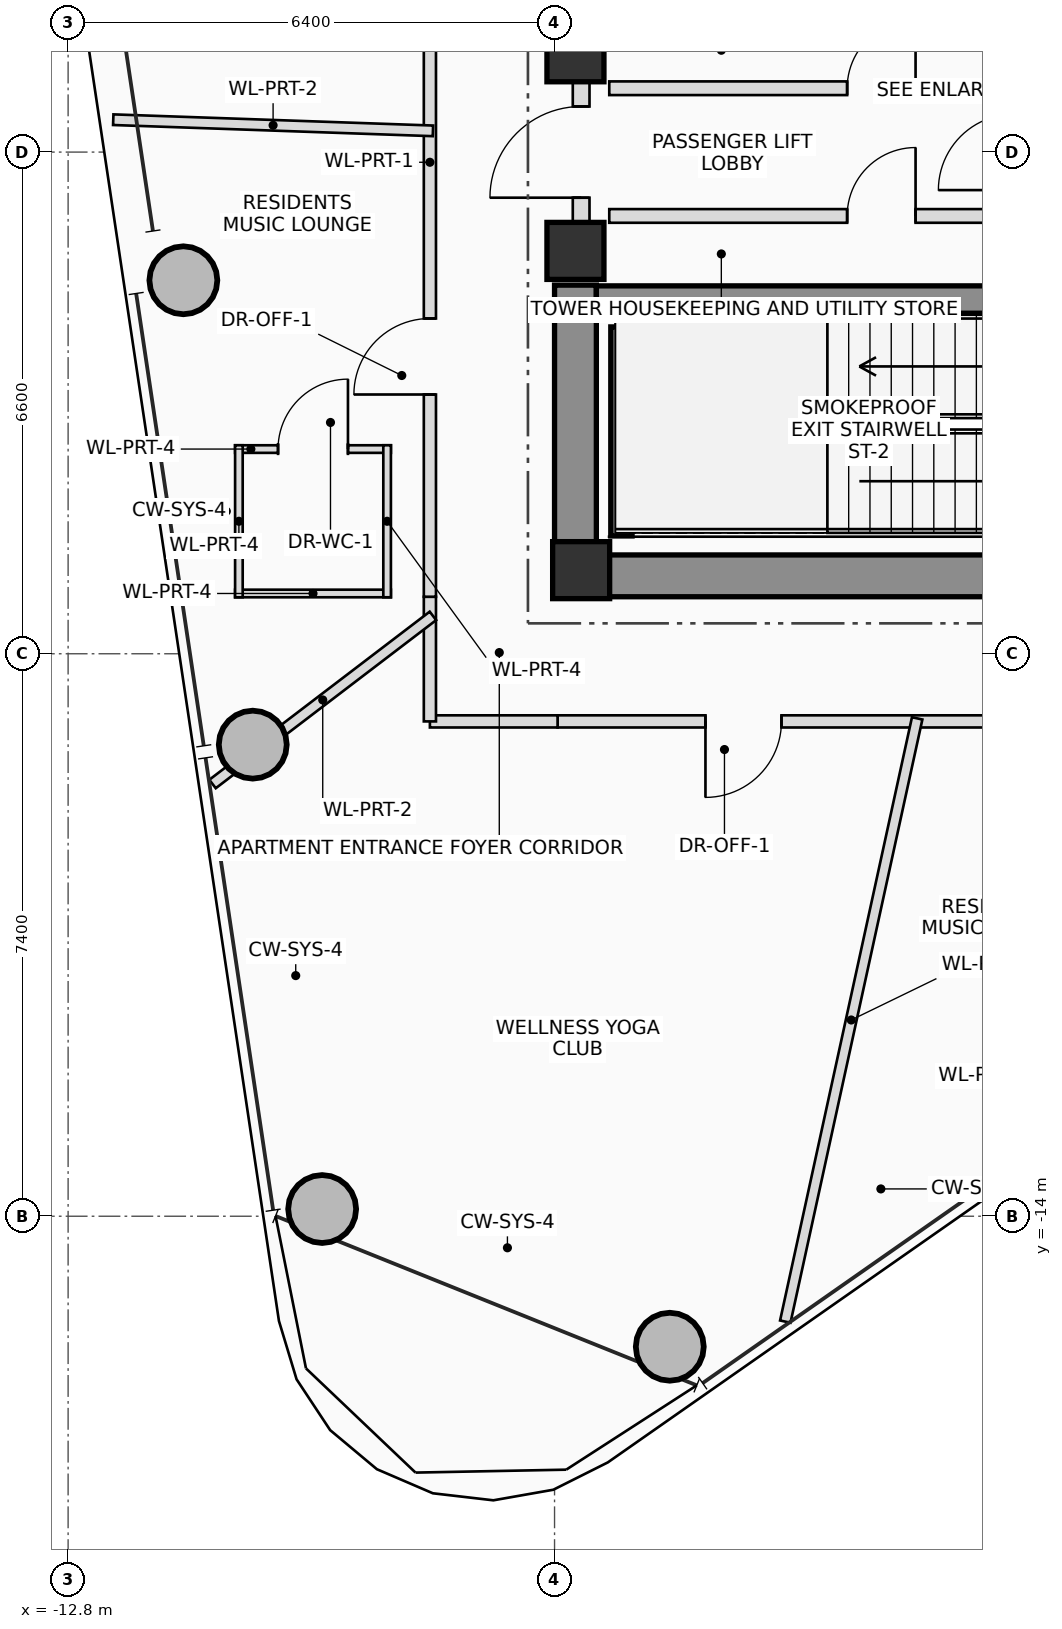
"""IFC4 building model, lengths in metres.
Left out: names, types, materials, properties, quantities, classifications, styles, units other than length and angle.
Written with IfcOpenShell. Run it as: python <this file> out.ifc"""

import sys

from ifc_helpers import new_model, si_unit, direction, frame, frame_2d, origin, origin_2d, place, context, subcontext, project, spatial, rectangle, hollow_circle, extrude, source, transform, mapped, element, fill, save


model = new_model("IFC4")
c1 = context("Model", 3, precision=1e-05, world=origin(), true_north=direction((0.0, 1.0)))
c2 = subcontext(c1, "Body", "Model", "MODEL_VIEW")
j1 = project(units=[si_unit("LENGTHUNIT", "METRE"), si_unit("PLANEANGLEUNIT", "RADIAN")], contexts=[c1])
p1 = place(None, origin())
s1 = spatial("IfcSite", under=j1, at=p1, CompositionType="ELEMENT")
p2 = place(p1, origin())
s2 = spatial("IfcBuilding", under=s1, at=p2, CompositionType="ELEMENT")
p3 = place(p2, frame((0.0, 0.0, 264.35)))
s3 = spatial("IfcBuildingStorey", under=s2, at=p3, CompositionType="ELEMENT", Elevation=264.35)
m1 = source(origin(), c2, "Body", "SweptSolid", [
    extrude(rectangle(XDim=0.75, YDim=0.75, at=origin_2d()), origin(), (0.0, 0.0, 1.0), 3.4),
])
p4 = place(p3, frame((-6.05, -5.5, 0.0), z_axis=(0.0, 0.0, 1.0), x_axis=(1.0, 0.0, 0.0)))
e1 = element("IfcColumn", 1, at=p4, inside=s3, PredefinedType="COLUMN", context=c2, shape_type="MappedRepresentation", body=[
    mapped(m1, transform((0.0, 0.0, 0.0), scale=1.0)),
])
p5 = place(p3, frame((-6.4, -5.575, 0.0), z_axis=(0.0, 0.0, 1.0), x_axis=(1.0, 0.0, 0.0)))
e2 = element("IfcWall", 2, at=p5, inside=s3, PredefinedType="SHEAR", context=c2, shape_type="SweptSolid", body=[
    extrude(rectangle(XDim=12.8, YDim=0.55, at=frame_2d((6.4, 0.0))), origin(), (0.0, 0.0, 1.0), 3.4),
])
p6 = place(p5, frame((8.6, 0.0, 0.0)))
e3 = element("IfcOpeningElement", 3, at=p6, cuts=e2, PredefinedType="OPENING", context=c2, shape_type="SweptSolid", body=[
    extrude(rectangle(XDim=1.2, YDim=2.2, at=frame_2d((0.6, 1.1))), frame((0.0, 0.285, 0.0), z_axis=(0.0, -1.0, 0.0), x_axis=(1.0, 0.0, 0.0)), (0.0, 0.0, 1.0), 0.57),
])
p7 = place(p3, frame((-6.125, -5.3, 0.0), z_axis=(0.0, 0.0, 1.0), x_axis=(0.0, 1.0, 0.0)))
e4 = element("IfcWall", 4, at=p7, inside=s3, PredefinedType="SHEAR", context=c2, shape_type="SweptSolid", body=[
    extrude(rectangle(XDim=3.55, YDim=0.55, at=frame_2d((1.775, 0.0))), origin(), (0.0, 0.0, 1.0), 3.4),
])
p8 = place(p3, frame((-5.85, -1.94, 0.0), z_axis=(0.0, 0.0, 1.0), x_axis=(1.0, 0.0, 0.0)))
e5 = element("IfcWall", 5, at=p8, inside=s3, PredefinedType="SHEAR", context=c2, shape_type="SweptSolid", body=[
    extrude(rectangle(XDim=11.7, YDim=0.36, at=frame_2d((5.85, 0.0))), origin(), (0.0, 0.0, 1.0), 3.4),
])
p9 = place(p3, frame((-5.52, -5.05, 0.0), z_axis=(0.0, 0.0, 1.0), x_axis=(0.0, 1.0, 0.0)))
e6 = element("IfcWall", 6, at=p9, inside=s3, PredefinedType="SHEAR", context=c2, shape_type="SweptSolid", body=[
    extrude(rectangle(XDim=2.75, YDim=0.28, at=frame_2d((1.375, 0.0))), origin(), (0.0, 0.0, 1.0), 3.4),
])
for number, where, z_axis, x_axis in (
    (7, (-6.125, -1.3, 0.0), (0.0, 0.0, 1.0), (1.0, 0.0, 0.0)),
    (8, (-6.125, 1.3, 0.0), (0.0, 0.0, 1.0), (1.0, 0.0, 0.0)),
):
    element("IfcColumn", number, at=place(p3, frame(where, z_axis=z_axis, x_axis=x_axis)), inside=s3, PredefinedType="COLUMN", context=c2, shape_type="MappedRepresentation", body=[
        mapped(m1, transform((0.0, 0.0, 0.0), scale=1.0)),
    ])
m2 = source(origin(), c2, "Body", "SweptSolid", [
    extrude(hollow_circle(Radius=0.45, WallThickness=0.032, at=origin_2d()), origin(), (0.0, 0.0, 1.0), 3.4),
])
for number, where, z_axis, x_axis in (
    (9, (-4.884, -15.717, 0.0), (0.0, 0.0, 1.0), (1.0, 0.0, 0.0)),
    (10, (-11.284, -1.686, 0.0), (0.0, 0.0, 1.0), (1.0, 0.0, 0.0)),
    (11, (-10.371, -7.796, 0.0), (0.0, 0.0, 1.0), (1.0, 0.0, 0.0)),
    (12, (-9.458, -13.905, 0.0), (0.0, 0.0, 1.0), (1.0, 0.0, 0.0)),
):
    element("IfcColumn", number, at=place(p3, frame(where, z_axis=z_axis, x_axis=x_axis)), inside=s3, PredefinedType="COLUMN", context=c2, shape_type="MappedRepresentation", body=[
        mapped(m2, transform((0.0, 0.0, 0.0), scale=1.0)),
    ])
p10 = place(p3, frame((-6.05, -0.95, 0.0), z_axis=(0.0, 0.0, 1.0), x_axis=(0.0, 1.0, 0.0)))
e13 = element("IfcWall", 13, at=p10, inside=s3, PredefinedType="PLUMBINGWALL", context=c2, shape_type="SweptSolid", body=[
    extrude(rectangle(XDim=1.9, YDim=0.22, at=frame_2d((0.95, 0.0))), origin(), (0.0, 0.0, 1.0), 2.18),
])
p11 = place(p10, frame((0.35, 0.0, 0.0)))
e14 = element("IfcOpeningElement", 14, at=p11, cuts=e13, PredefinedType="OPENING", context=c2, shape_type="SweptSolid", body=[
    extrude(rectangle(XDim=1.2, YDim=2.2, at=frame_2d((0.6, 1.1))), frame((0.0, 0.12, 0.0), z_axis=(0.0, -1.0, 0.0), x_axis=(1.0, 0.0, 0.0)), (0.0, 0.0, 1.0), 0.24),
])
p12 = place(p3, frame((-5.68, 0.84, 0.0), z_axis=(0.0, 0.0, 1.0), x_axis=(1.0, 0.0, 0.0)))
e15 = element("IfcWall", 15, at=p12, inside=s3, PredefinedType="PLUMBINGWALL", context=c2, shape_type="SweptSolid", body=[
    extrude(rectangle(XDim=11.33, YDim=0.18, at=frame_2d((5.665, 0.0))), origin(), (0.0, 0.0, 1.0), 3.2),
])
p13 = place(p12, frame((3.13, 0.0, 0.0)))
e16 = element("IfcOpeningElement", 16, at=p13, cuts=e15, PredefinedType="OPENING", context=c2, shape_type="SweptSolid", body=[
    extrude(rectangle(XDim=0.9, YDim=2.05, at=frame_2d((0.45, 1.025))), frame((0.0, 0.1, 0.0), z_axis=(0.0, -1.0, 0.0), x_axis=(1.0, 0.0, 0.0)), (0.0, 0.0, 1.0), 0.2),
])
p14 = place(p12, frame((7.33, 0.0, 0.0)))
e17 = element("IfcOpeningElement", 17, at=p14, cuts=e15, PredefinedType="OPENING", context=c2, shape_type="SweptSolid", body=[
    extrude(rectangle(XDim=1.1, YDim=2.2, at=frame_2d((0.55, 1.1))), frame((0.0, 0.1, 0.0), z_axis=(0.0, -1.0, 0.0), x_axis=(1.0, 0.0, 0.0)), (0.0, 0.0, 1.0), 0.2),
])
p15 = place(p12, frame((8.83, 0.0, 0.0)))
e18 = element("IfcOpeningElement", 18, at=p15, cuts=e15, PredefinedType="OPENING", context=c2, shape_type="SweptSolid", body=[
    extrude(rectangle(XDim=1.1, YDim=2.2, at=frame_2d((0.55, 1.1))), frame((0.0, 0.1, 0.0), z_axis=(0.0, -1.0, 0.0), x_axis=(1.0, 0.0, 0.0)), (0.0, 0.0, 1.0), 0.2),
])
p16 = place(p12, frame((10.25, 0.0, 0.0)))
e19 = element("IfcOpeningElement", 19, at=p16, cuts=e15, PredefinedType="OPENING", context=c2, shape_type="SweptSolid", body=[
    extrude(rectangle(XDim=0.9, YDim=2.05, at=frame_2d((0.45, 1.025))), frame((0.0, 0.1, 0.0), z_axis=(0.0, -1.0, 0.0), x_axis=(1.0, 0.0, 0.0)), (0.0, 0.0, 1.0), 0.2),
])
p17 = place(p3, frame((-5.68, -0.84, 0.0), z_axis=(0.0, 0.0, 1.0), x_axis=(1.0, 0.0, 0.0)))
e20 = element("IfcWall", 20, at=p17, inside=s3, PredefinedType="PLUMBINGWALL", context=c2, shape_type="SweptSolid", body=[
    extrude(rectangle(XDim=11.33, YDim=0.18, at=frame_2d((5.665, 0.0))), origin(), (0.0, 0.0, 1.0), 3.2),
])
p18 = place(p17, frame((3.13, 0.0, 0.0)))
e21 = element("IfcOpeningElement", 21, at=p18, cuts=e20, PredefinedType="OPENING", context=c2, shape_type="SweptSolid", body=[
    extrude(rectangle(XDim=0.9, YDim=2.05, at=frame_2d((0.45, 1.025))), frame((0.0, 0.1, 0.0), z_axis=(0.0, -1.0, 0.0), x_axis=(1.0, 0.0, 0.0)), (0.0, 0.0, 1.0), 0.2),
])
p19 = place(p17, frame((7.33, 0.0, 0.0)))
e22 = element("IfcOpeningElement", 22, at=p19, cuts=e20, PredefinedType="OPENING", context=c2, shape_type="SweptSolid", body=[
    extrude(rectangle(XDim=1.1, YDim=2.2, at=frame_2d((0.55, 1.1))), frame((0.0, 0.1, 0.0), z_axis=(0.0, -1.0, 0.0), x_axis=(1.0, 0.0, 0.0)), (0.0, 0.0, 1.0), 0.2),
])
p20 = place(p17, frame((9.58, 0.0, 0.0)))
e23 = element("IfcOpeningElement", 23, at=p20, cuts=e20, PredefinedType="OPENING", context=c2, shape_type="SweptSolid", body=[
    extrude(rectangle(XDim=0.9, YDim=2.05, at=frame_2d((0.45, 1.025))), frame((0.0, 0.1, 0.0), z_axis=(0.0, -1.0, 0.0), x_axis=(1.0, 0.0, 0.0)), (0.0, 0.0, 1.0), 0.2),
])
p21 = place(p3, frame((-10.603, -3.907, 0.0), z_axis=(0.0, 0.0, 1.0), x_axis=(1.0, 0.0, 0.0)))
e24 = element("IfcWall", 24, at=p21, inside=s3, PredefinedType="PARTITIONING", context=c2, shape_type="SweptSolid", body=[
    extrude(rectangle(XDim=2.05, YDim=0.1, at=frame_2d((1.025, 0.0))), origin(), (0.0, 0.0, 1.0), 2.805),
])
p22 = place(p21, frame((0.565, 0.0, 0.0)))
e25 = element("IfcOpeningElement", 25, at=p22, cuts=e24, PredefinedType="OPENING", context=c2, shape_type="SweptSolid", body=[
    extrude(rectangle(XDim=0.92, YDim=2.1, at=frame_2d((0.46, 1.05))), frame((0.0, 0.06, 0.0), z_axis=(0.0, -1.0, 0.0), x_axis=(1.0, 0.0, 0.0)), (0.0, 0.0, 1.0), 0.12),
])
p23 = place(p3, frame((-8.553, -5.807, 0.0), z_axis=(0.0, 0.0, 1.0), x_axis=(-1.0, 0.0, 0.0)))
e26 = element("IfcWall", 26, at=p23, inside=s3, PredefinedType="PARTITIONING", context=c2, shape_type="SweptSolid", body=[
    extrude(rectangle(XDim=2.05, YDim=0.1, at=frame_2d((1.025, 0.0))), origin(), (0.0, 0.0, 1.0), 2.765),
])
p24 = place(p3, frame((-8.603, -3.857, 0.0), z_axis=(0.0, 0.0, 1.0), x_axis=(0.0, -1.0, 0.0)))
e27 = element("IfcWall", 27, at=p24, inside=s3, PredefinedType="PARTITIONING", context=c2, shape_type="SweptSolid", body=[
    extrude(rectangle(XDim=2.0, YDim=0.1, at=frame_2d((1.0, 0.0))), origin(), (0.0, 0.0, 1.0), 2.805),
])
p25 = place(p3, frame((-10.553, -5.857, 0.0), z_axis=(0.0, 0.0, 1.0), x_axis=(0.0, 1.0, 0.0)))
e28 = element("IfcWall", 28, at=p25, inside=s3, PredefinedType="PARTITIONING", context=c2, shape_type="SweptSolid", body=[
    extrude(rectangle(XDim=2.0, YDim=0.1, at=frame_2d((1.0, 0.0))), origin(), (0.0, 0.0, 1.0), 2.765),
])
p26 = place(p3, frame((3.45, -7.49, 0.0), z_axis=(0.0, 0.0, 1.0), x_axis=(-1.0, 0.0, 0.0)))
e29 = element("IfcWall", 29, at=p26, inside=s3, PredefinedType="PARTITIONING", context=c2, shape_type="SweptSolid", body=[
    extrude(rectangle(XDim=9.81, YDim=0.16, at=frame_2d((4.905, 0.0))), origin(), (0.0, 0.0, 1.0), 2.605),
])
p27 = place(p26, frame((2.973, 0.0, 0.0)))
e30 = element("IfcOpeningElement", 30, at=p27, cuts=e29, PredefinedType="OPENING", context=c2, shape_type="SweptSolid", body=[
    extrude(rectangle(XDim=1.0, YDim=2.25, at=frame_2d((0.5, 1.125))), frame((0.0, 0.09, 0.0), z_axis=(0.0, -1.0, 0.0), x_axis=(1.0, 0.0, 0.0)), (0.0, 0.0, 1.0), 0.18),
])
p28 = place(p26, frame((6.865, 0.0, 0.0)))
e31 = element("IfcOpeningElement", 31, at=p28, cuts=e29, PredefinedType="OPENING", context=c2, shape_type="SweptSolid", body=[
    extrude(rectangle(XDim=1.0, YDim=2.25, at=frame_2d((0.5, 1.125))), frame((0.0, 0.09, 0.0), z_axis=(0.0, -1.0, 0.0), x_axis=(1.0, 0.0, 0.0)), (0.0, 0.0, 1.0), 0.18),
])
p29 = place(p3, frame((-6.36, -7.49, 0.0), z_axis=(0.0, 0.0, 1.0), x_axis=(-1.0, 0.0, 0.0)))
e32 = element("IfcWall", 32, at=p29, inside=s3, PredefinedType="PARTITIONING", context=c2, shape_type="SweptSolid", body=[
    extrude(rectangle(XDim=1.68, YDim=0.16, at=frame_2d((0.84, 0.0))), origin(), (0.0, 0.0, 1.0), 2.605),
])
p30 = place(p3, frame((-8.04, -7.49, 0.0), z_axis=(0.0, 0.0, 1.0), x_axis=(0.0, 1.0, 0.0)))
e33 = element("IfcWall", 33, at=p30, inside=s3, PredefinedType="PARTITIONING", context=c2, shape_type="SweptSolid", body=[
    extrude(rectangle(XDim=1.64, YDim=0.16, at=frame_2d((0.82, 0.0))), origin(), (0.0, 0.0, 1.0), 2.605),
])
p31 = place(p3, frame((-8.04, -5.85, 0.0), z_axis=(0.0, 0.0, 1.0), x_axis=(0.0, 1.0, 0.0)))
e34 = element("IfcWall", 34, at=p31, inside=s3, PredefinedType="PARTITIONING", context=c2, shape_type="SweptSolid", body=[
    extrude(rectangle(XDim=11.7, YDim=0.16, at=frame_2d((5.85, 0.0))), origin(), (0.0, 0.0, 1.0), 2.605),
])
p32 = place(p31, frame((2.661, 0.0, 0.0)))
e35 = element("IfcOpeningElement", 35, at=p32, cuts=e34, PredefinedType="OPENING", context=c2, shape_type="SweptSolid", body=[
    extrude(rectangle(XDim=1.0, YDim=2.25, at=frame_2d((0.5, 1.125))), frame((0.0, 0.09, 0.0), z_axis=(0.0, -1.0, 0.0), x_axis=(1.0, 0.0, 0.0)), (0.0, 0.0, 1.0), 0.18),
])
p33 = place(p31, frame((7.771, 0.0, 0.0)))
e36 = element("IfcOpeningElement", 36, at=p33, cuts=e34, PredefinedType="OPENING", context=c2, shape_type="SweptSolid", body=[
    extrude(rectangle(XDim=1.0, YDim=2.25, at=frame_2d((0.5, 1.125))), frame((0.0, 0.09, 0.0), z_axis=(0.0, -1.0, 0.0), x_axis=(1.0, 0.0, 0.0)), (0.0, 0.0, 1.0), 0.18),
])
p34 = place(p3, frame((-8.0, 0.279, 0.0), z_axis=(0.0, 0.0, 1.0), x_axis=(-0.999390047844, 0.034921802229, 0.0)))
e37 = element("IfcWall", 37, at=p34, inside=s3, PredefinedType="PARTITIONING", context=c2, shape_type="SweptSolid", body=[
    extrude(rectangle(XDim=4.209, YDim=0.14, at=frame_2d((2.104, 0.0))), origin(), (0.0, 0.0, 1.0), 2.765),
])
p35 = place(p3, frame((-8.0, -6.102, 0.0), z_axis=(0.0, 0.0, 1.0), x_axis=(-0.795138118829, -0.606428373335, 0.0)))
e38 = element("IfcWall", 38, at=p35, inside=s3, PredefinedType="PARTITIONING", context=c2, shape_type="SweptSolid", body=[
    extrude(rectangle(XDim=3.647, YDim=0.14, at=frame_2d((1.823, 0.0))), origin(), (0.0, 0.0, 1.0), 2.605),
])
p36 = place(p3, frame((-1.629, -7.45, 0.0), z_axis=(0.0, 0.0, 1.0), x_axis=(-0.213607255038, -0.976919618287, 0.0)))
e39 = element("IfcWall", 39, at=p36, inside=s3, PredefinedType="PARTITIONING", context=c2, shape_type="SweptSolid", body=[
    extrude(rectangle(XDim=8.124, YDim=0.14, at=frame_2d((4.062, 0.0))), origin(), (0.0, 0.0, 1.0), 2.765),
])
p37 = place(p11, origin())
e40 = element("IfcDoor", 40, at=p37, inside=s3, OperationType="SINGLE_SWING_LEFT", PredefinedType="DOOR", context=c2, shape_type="SweptSolid", body=[
    extrude(rectangle(XDim=1.2, YDim=2.2, at=frame_2d((0.6, 1.1))), frame((0.0, 0.025, 0.0), z_axis=(0.0, -1.0, 0.0), x_axis=(1.0, 0.0, 0.0)), (0.0, 0.0, 1.0), 0.05),
])
fill(e14, e40)
p38 = place(p13, origin())
e41 = element("IfcDoor", 41, at=p38, inside=s3, OperationType="SINGLE_SWING_RIGHT", PredefinedType="DOOR", context=c2, shape_type="SweptSolid", body=[
    extrude(rectangle(XDim=0.9, YDim=2.05, at=frame_2d((0.45, 1.025))), frame((0.0, 0.025, 0.0), z_axis=(0.0, -1.0, 0.0), x_axis=(1.0, 0.0, 0.0)), (0.0, 0.0, 1.0), 0.05),
])
fill(e16, e41)
p39 = place(p18, origin())
e42 = element("IfcDoor", 42, at=p39, inside=s3, OperationType="SINGLE_SWING_RIGHT", PredefinedType="DOOR", context=c2, shape_type="SweptSolid", body=[
    extrude(rectangle(XDim=0.9, YDim=2.05, at=frame_2d((0.45, 1.025))), frame((0.0, 0.025, 0.0), z_axis=(0.0, -1.0, 0.0), x_axis=(1.0, 0.0, 0.0)), (0.0, 0.0, 1.0), 0.05),
])
fill(e21, e42)
p40 = place(p22, origin())
e43 = element("IfcDoor", 43, at=p40, inside=s3, OperationType="SINGLE_SWING_RIGHT", PredefinedType="DOOR", context=c2, shape_type="SweptSolid", body=[
    extrude(rectangle(XDim=0.92, YDim=2.1, at=frame_2d((0.46, 1.05))), frame((0.0, 0.025, 0.0), z_axis=(0.0, -1.0, 0.0), x_axis=(1.0, 0.0, 0.0)), (0.0, 0.0, 1.0), 0.05),
])
fill(e25, e43)
p41 = place(p28, origin())
e44 = element("IfcDoor", 44, at=p41, inside=s3, OperationType="SINGLE_SWING_RIGHT", PredefinedType="DOOR", context=c2, shape_type="SweptSolid", body=[
    extrude(rectangle(XDim=1.0, YDim=2.25, at=frame_2d((0.5, 1.125))), frame((0.0, 0.025, 0.0), z_axis=(0.0, -1.0, 0.0), x_axis=(1.0, 0.0, 0.0)), (0.0, 0.0, 1.0), 0.05),
])
fill(e31, e44)
p42 = place(p32, origin())
e45 = element("IfcDoor", 45, at=p42, inside=s3, OperationType="SINGLE_SWING_LEFT", PredefinedType="DOOR", context=c2, shape_type="SweptSolid", body=[
    extrude(rectangle(XDim=1.0, YDim=2.25, at=frame_2d((0.5, 1.125))), frame((0.0, 0.025, 0.0), z_axis=(0.0, -1.0, 0.0), x_axis=(1.0, 0.0, 0.0)), (0.0, 0.0, 1.0), 0.05),
])
fill(e35, e45)
save(model, sys.argv[1])
